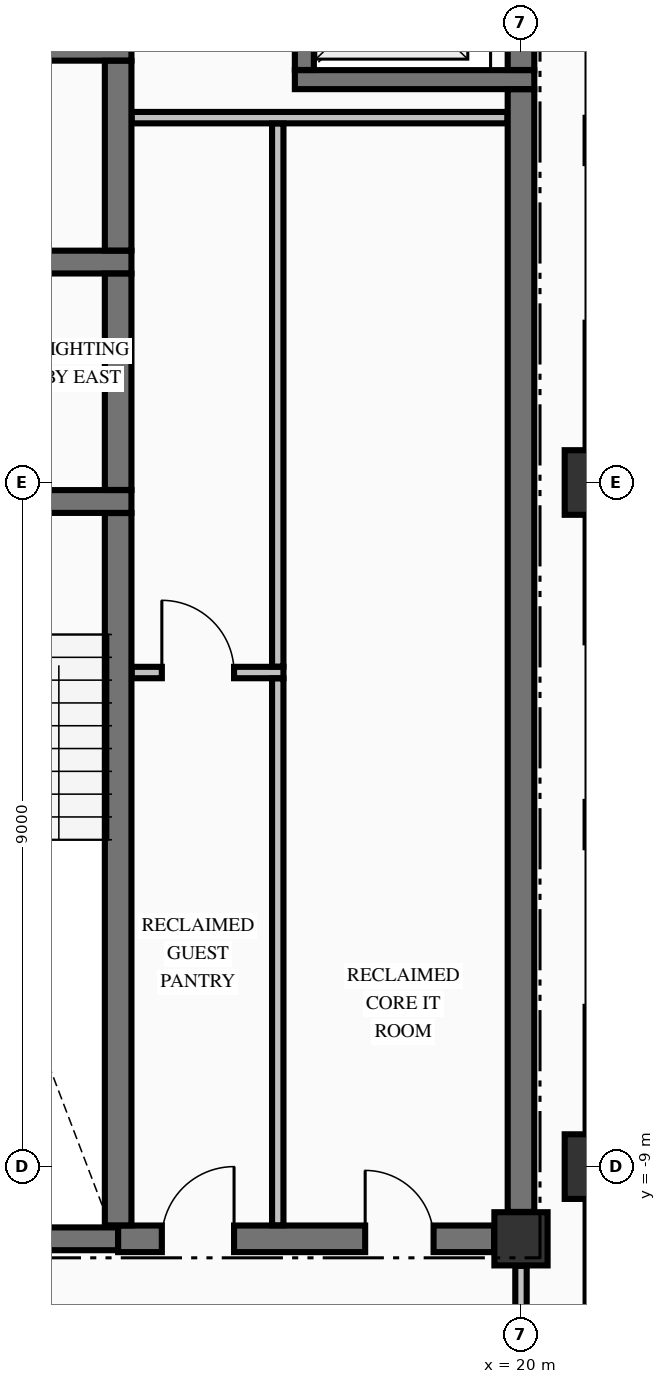
"""IFC4 building model, lengths in metres.
Left out: names, types, materials, properties, quantities, classifications, styles, units other than length and angle.
Written with IfcOpenShell. Run it as: python <this file> out.ifc"""

import sys

from ifc_helpers import new_model, si_unit, direction, frame, frame_2d, origin, origin_2d, place, context, subcontext, project, spatial, rectangle, extrude, element, fill, save


model = new_model("IFC4")
c1 = context("Model", 3, precision=1e-05, world=origin(), true_north=direction((0.0, 1.0)))
c2 = subcontext(c1, "Body", "Model", "MODEL_VIEW")
j1 = project(units=[si_unit("LENGTHUNIT", "METRE"), si_unit("PLANEANGLEUNIT", "RADIAN")], contexts=[c1])
p1 = place(None, origin())
s1 = spatial("IfcSite", under=j1, at=p1, CompositionType="ELEMENT")
p2 = place(p1, origin())
s2 = spatial("IfcBuilding", under=s1, at=p2, CompositionType="ELEMENT")
p3 = place(p2, frame((0.0, 0.0, 260.89)))
s3 = spatial("IfcBuildingStorey", under=s2, at=p3, CompositionType="ELEMENT", Elevation=260.89)
for number, where, z_axis, x_axis in (
    (1, (21.0, -9.0, -0.25), (0.0, 0.0, 1.0), (1.0, 0.0, 0.0)),
    (2, (21.0, 0.0, -0.25), (0.0, 0.0, 1.0), (1.0, 0.0, 0.0)),
):
    element("IfcColumn", number, at=place(p3, frame(where, z_axis=z_axis, x_axis=x_axis)), inside=s3, PredefinedType="COLUMN", context=c2, shape_type="SweptSolid", body=[
        extrude(rectangle(XDim=0.85, YDim=0.85, at=origin_2d()), origin(), (0.0, 0.0, 1.0), 3.23),
    ])
p4 = place(p3, frame((20.0, -9.95, -0.25), z_axis=(0.0, 0.0, 1.0), x_axis=(1.0, 0.0, 0.0)))
e3 = element("IfcColumn", 3, at=p4, inside=s3, PredefinedType="COLUMN", context=c2, shape_type="SweptSolid", body=[
    extrude(rectangle(XDim=0.7, YDim=0.7, at=origin_2d()), origin(), (0.0, 0.0, 1.0), 3.23),
])
p5 = place(p3, frame((21.0, -17.545, 0.0), z_axis=(0.0, 0.0, 1.0), x_axis=(0.0, 1.0, 0.0)))
e4 = element("IfcWall", 4, at=p5, inside=s3, PredefinedType="STANDARD", context=c2, shape_type="SweptSolid", body=[
    extrude(rectangle(XDim=8.09, YDim=0.3, at=frame_2d((4.045, 0.0))), origin(), (0.0, 0.0, 1.0), 2.372),
])
p6 = place(p3, frame((21.0, -8.545, 0.0), z_axis=(0.0, 0.0, 1.0), x_axis=(0.0, 1.0, 0.0)))
e5 = element("IfcWall", 5, at=p6, inside=s3, PredefinedType="STANDARD", context=c2, shape_type="SweptSolid", body=[
    extrude(rectangle(XDim=8.09, YDim=0.3, at=frame_2d((4.045, 0.0))), origin(), (0.0, 0.0, 1.0), 2.372),
])
p7 = place(p6, frame((1.647, 0.0, 0.7)))
e6 = element("IfcOpeningElement", 6, at=p7, cuts=e5, PredefinedType="OPENING", context=c2, shape_type="SweptSolid", body=[
    extrude(rectangle(XDim=2.1, YDim=1.5, at=frame_2d((1.05, 0.75))), frame((0.0, 0.16, 0.0), z_axis=(0.0, -1.0, 0.0), x_axis=(1.0, 0.0, 0.0)), (0.0, 0.0, 1.0), 0.32),
])
p8 = place(p6, frame((4.343, 0.0, 0.7)))
e7 = element("IfcOpeningElement", 7, at=p8, cuts=e5, PredefinedType="OPENING", context=c2, shape_type="SweptSolid", body=[
    extrude(rectangle(XDim=2.1, YDim=1.5, at=frame_2d((1.05, 0.75))), frame((0.0, 0.16, 0.0), z_axis=(0.0, -1.0, 0.0), x_axis=(1.0, 0.0, 0.0)), (0.0, 0.0, 1.0), 0.32),
])
p9 = place(p3, frame((21.0, 0.455, 0.0), z_axis=(0.0, 0.0, 1.0), x_axis=(0.0, 1.0, 0.0)))
e8 = element("IfcWall", 8, at=p9, inside=s3, PredefinedType="STANDARD", context=c2, shape_type="SweptSolid", body=[
    extrude(rectangle(XDim=8.09, YDim=0.3, at=frame_2d((4.045, 0.0))), origin(), (0.0, 0.0, 1.0), 2.372),
])
p10 = place(p9, frame((1.647, 0.0, 0.7)))
e9 = element("IfcOpeningElement", 9, at=p10, cuts=e8, PredefinedType="OPENING", context=c2, shape_type="SweptSolid", body=[
    extrude(rectangle(XDim=2.1, YDim=1.5, at=frame_2d((1.05, 0.75))), frame((0.0, 0.16, 0.0), z_axis=(0.0, -1.0, 0.0), x_axis=(1.0, 0.0, 0.0)), (0.0, 0.0, 1.0), 0.32),
])
p11 = place(p9, frame((4.343, 0.0, 0.7)))
e10 = element("IfcOpeningElement", 10, at=p11, cuts=e8, PredefinedType="OPENING", context=c2, shape_type="SweptSolid", body=[
    extrude(rectangle(XDim=2.1, YDim=1.5, at=frame_2d((1.05, 0.75))), frame((0.0, 0.16, 0.0), z_axis=(0.0, -1.0, 0.0), x_axis=(1.0, 0.0, 0.0)), (0.0, 0.0, 1.0), 0.32),
])
p12 = place(p3, frame((11.354, -9.95, 0.0), z_axis=(0.0, 0.0, 1.0), x_axis=(1.0, 0.0, 0.0)))
e11 = element("IfcWall", 11, at=p12, inside=s3, PredefinedType="SHEAR", context=c2, shape_type="SweptSolid", body=[
    extrude(rectangle(XDim=3.346, YDim=0.3, at=frame_2d((1.673, 0.0))), origin(), (0.0, 0.0, 1.0), 2.98),
])
p13 = place(p3, frame((14.7, -9.95, 0.0), z_axis=(0.0, 0.0, 1.0), x_axis=(1.0, 0.0, 0.0)))
e12 = element("IfcWall", 12, at=p13, inside=s3, PredefinedType="SHEAR", context=c2, shape_type="SweptSolid", body=[
    extrude(rectangle(XDim=4.946, YDim=0.35, at=frame_2d((2.473, 0.0))), origin(), (0.0, 0.0, 1.0), 2.98),
])
p14 = place(p13, frame((3.25, 0.0, 0.0)))
e13 = element("IfcOpeningElement", 13, at=p14, cuts=e12, PredefinedType="OPENING", context=c2, shape_type="SweptSolid", body=[
    extrude(rectangle(XDim=0.9, YDim=2.15, at=frame_2d((0.45, 1.075))), frame((0.0, 0.185, 0.0), z_axis=(0.0, -1.0, 0.0), x_axis=(1.0, 0.0, 0.0)), (0.0, 0.0, 1.0), 0.37),
])
p15 = place(p13, frame((0.575, 0.0, 0.0)))
e14 = element("IfcOpeningElement", 14, at=p15, cuts=e12, PredefinedType="OPENING", context=c2, shape_type="SweptSolid", body=[
    extrude(rectangle(XDim=0.95, YDim=2.15, at=frame_2d((0.475, 1.075))), frame((0.0, 0.185, 0.0), z_axis=(0.0, -1.0, 0.0), x_axis=(1.0, 0.0, 0.0)), (0.0, 0.0, 1.0), 0.37),
])
p16 = place(p3, frame((11.354, -0.25, 0.0), z_axis=(0.0, 0.0, 1.0), x_axis=(1.0, 0.0, 0.0)))
e15 = element("IfcWall", 15, at=p16, inside=s3, PredefinedType="SHEAR", context=c2, shape_type="SweptSolid", body=[
    extrude(rectangle(XDim=3.521, YDim=0.3, at=frame_2d((1.76, 0.0))), origin(), (0.0, 0.0, 1.0), 2.98),
])
p17 = place(p16, frame((1.246, 0.0, 0.0)))
e16 = element("IfcOpeningElement", 16, at=p17, cuts=e15, PredefinedType="OPENING", context=c2, shape_type="SweptSolid", body=[
    extrude(rectangle(XDim=1.1, YDim=2.15, at=frame_2d((0.55, 1.075))), frame((0.0, 0.16, 0.0), z_axis=(0.0, -1.0, 0.0), x_axis=(1.0, 0.0, 0.0)), (0.0, 0.0, 1.0), 0.32),
])
p18 = place(p3, frame((10.85, 2.9, 0.0), z_axis=(0.0, 0.0, 1.0), x_axis=(1.0, 0.0, 0.0)))
e17 = element("IfcWall", 17, at=p18, inside=s3, PredefinedType="SHEAR", context=c2, shape_type="SweptSolid", body=[
    extrude(rectangle(XDim=4.025, YDim=0.3, at=frame_2d((2.012, 0.0))), origin(), (0.0, 0.0, 1.0), 2.98),
])
p19 = place(p18, frame((0.85, 0.0, 0.0)))
e18 = element("IfcOpeningElement", 18, at=p19, cuts=e17, PredefinedType="OPENING", context=c2, shape_type="SweptSolid", body=[
    extrude(rectangle(XDim=1.1, YDim=2.2, at=frame_2d((0.55, 1.1))), frame((0.0, 0.16, 0.0), z_axis=(0.0, -1.0, 0.0), x_axis=(1.0, 0.0, 0.0)), (0.0, 0.0, 1.0), 0.32),
])
p20 = place(p3, frame((17.025, 5.3, 0.0), z_axis=(0.0, 0.0, 1.0), x_axis=(1.0, 0.0, 0.0)))
e19 = element("IfcWall", 19, at=p20, inside=s3, PredefinedType="SOLIDWALL", context=c2, shape_type="SweptSolid", body=[
    extrude(rectangle(XDim=3.15, YDim=0.25, at=frame_2d((1.575, 0.0))), origin(), (0.0, 0.0, 1.0), 2.98),
])
p21 = place(p3, frame((10.85, 5.7, 0.0), z_axis=(0.0, 0.0, 1.0), x_axis=(1.0, 0.0, 0.0)))
e20 = element("IfcWall", 20, at=p21, inside=s3, PredefinedType="SHEAR", context=c2, shape_type="SweptSolid", body=[
    extrude(rectangle(XDim=4.025, YDim=0.3, at=frame_2d((2.012, 0.0))), origin(), (0.0, 0.0, 1.0), 2.98),
])
p22 = place(p3, frame((14.878, -2.5, 0.0), z_axis=(0.0, 0.0, 1.0), x_axis=(1.0, 0.0, 0.0)))
e21 = element("IfcWall", 21, at=p22, inside=s3, PredefinedType="PARTITIONING", context=c2, shape_type="SweptSolid", body=[
    extrude(rectangle(XDim=1.997, YDim=0.15, at=frame_2d((0.999, 0.0))), origin(), (0.0, 0.0, 1.0), 2.98),
])
p23 = place(p22, frame((0.397, 0.0, 0.0)))
e22 = element("IfcOpeningElement", 22, at=p23, cuts=e21, PredefinedType="OPENING", context=c2, shape_type="SweptSolid", body=[
    extrude(rectangle(XDim=0.95, YDim=2.15, at=frame_2d((0.475, 1.075))), frame((0.0, 0.085, 0.0), z_axis=(0.0, -1.0, 0.0), x_axis=(1.0, 0.0, 0.0)), (0.0, 0.0, 1.0), 0.17),
])
p24 = place(p3, frame((14.878, 4.8, 0.0), z_axis=(0.0, 0.0, 1.0), x_axis=(1.0, 0.0, 0.0)))
e23 = element("IfcWall", 23, at=p24, inside=s3, PredefinedType="PARTITIONING", context=c2, shape_type="SweptSolid", body=[
    extrude(rectangle(XDim=4.944, YDim=0.15, at=frame_2d((2.472, 0.0))), origin(), (0.0, 0.0, 1.0), 2.98),
])
p25 = place(p3, frame((14.7, -9.773, 0.0), z_axis=(0.0, 0.0, 1.0), x_axis=(0.0, 1.0, 0.0)))
e24 = element("IfcWall", 24, at=p25, inside=s3, PredefinedType="SHEAR", context=c2, shape_type="SweptSolid", body=[
    extrude(rectangle(XDim=9.371, YDim=0.35, at=frame_2d((4.686, 0.0))), origin(), (0.0, 0.0, 1.0), 2.98),
])
p26 = place(p3, frame((14.7, -0.098, 0.0), z_axis=(0.0, 0.0, 1.0), x_axis=(0.0, 1.0, 0.0)))
e25 = element("IfcWall", 25, at=p26, inside=s3, PredefinedType="SHEAR", context=c2, shape_type="SweptSolid", body=[
    extrude(rectangle(XDim=2.846, YDim=0.35, at=frame_2d((1.423, 0.0))), origin(), (0.0, 0.0, 1.0), 2.98),
])
p27 = place(p3, frame((14.7, 3.052, 0.0), z_axis=(0.0, 0.0, 1.0), x_axis=(0.0, 1.0, 0.0)))
e26 = element("IfcWall", 26, at=p27, inside=s3, PredefinedType="SHEAR", context=c2, shape_type="SweptSolid", body=[
    extrude(rectangle(XDim=2.496, YDim=0.35, at=frame_2d((1.248, 0.0))), origin(), (0.0, 0.0, 1.0), 2.98),
])
p28 = place(p3, frame((17.15, 5.427, 0.0), z_axis=(0.0, 0.0, 1.0), x_axis=(0.0, 1.0, 0.0)))
e27 = element("IfcWall", 27, at=p28, inside=s3, PredefinedType="SOLIDWALL", context=c2, shape_type="SweptSolid", body=[
    extrude(rectangle(XDim=2.196, YDim=0.25, at=frame_2d((1.098, 0.0))), origin(), (0.0, 0.0, 1.0), 2.98),
])
p29 = place(p28, frame((0.548, 0.0, 0.0)))
e28 = element("IfcOpeningElement", 28, at=p29, cuts=e27, PredefinedType="OPENING", context=c2, shape_type="SweptSolid", body=[
    extrude(rectangle(XDim=1.1, YDim=2.2, at=frame_2d((0.55, 1.1))), frame((0.0, 0.135, 0.0), z_axis=(0.0, -1.0, 0.0), x_axis=(1.0, 0.0, 0.0)), (0.0, 0.0, 1.0), 0.27),
])
p30 = place(p3, frame((20.0, -9.596, 0.0), z_axis=(0.0, 0.0, 1.0), x_axis=(0.0, 1.0, 0.0)))
e29 = element("IfcWall", 29, at=p30, inside=s3, PredefinedType="SHEAR", context=c2, shape_type="SweptSolid", body=[
    extrude(rectangle(XDim=14.769, YDim=0.35, at=frame_2d((7.385, 0.0))), origin(), (0.0, 0.0, 1.0), 2.98),
])
p31 = place(p3, frame((20.0, 5.427, 0.0), z_axis=(0.0, 0.0, 1.0), x_axis=(0.0, 1.0, 0.0)))
e30 = element("IfcWall", 30, at=p31, inside=s3, PredefinedType="SHEAR", context=c2, shape_type="SweptSolid", body=[
    extrude(rectangle(XDim=2.196, YDim=0.35, at=frame_2d((1.098, 0.0))), origin(), (0.0, 0.0, 1.0), 2.98),
])
p32 = place(p3, frame((16.8, -9.772, 0.0), z_axis=(0.0, 0.0, 1.0), x_axis=(0.0, 1.0, 0.0)))
e31 = element("IfcWall", 31, at=p32, inside=s3, PredefinedType="PARTITIONING", context=c2, shape_type="SweptSolid", body=[
    extrude(rectangle(XDim=7.194, YDim=0.15, at=frame_2d((3.597, 0.0))), origin(), (0.0, 0.0, 1.0), 2.98),
])
p33 = place(p3, frame((16.8, -2.422, 0.0), z_axis=(0.0, 0.0, 1.0), x_axis=(0.0, 1.0, 0.0)))
e32 = element("IfcWall", 32, at=p33, inside=s3, PredefinedType="PARTITIONING", context=c2, shape_type="SweptSolid", body=[
    extrude(rectangle(XDim=7.144, YDim=0.15, at=frame_2d((3.572, 0.0))), origin(), (0.0, 0.0, 1.0), 2.98),
])
p34 = place(p3, frame((20.0, -12.122, 0.0), z_axis=(0.0, 0.0, 1.0), x_axis=(0.0, 1.0, 0.0)))
e33 = element("IfcWall", 33, at=p34, inside=s3, PredefinedType="PARTITIONING", context=c2, shape_type="SweptSolid", body=[
    extrude(rectangle(XDim=1.816, YDim=0.15, at=frame_2d((0.908, 0.0))), origin(), (0.0, 0.0, 1.0), 2.57),
])
p35 = place(p14, origin())
e34 = element("IfcDoor", 34, at=p35, inside=s3, OperationType="SINGLE_SWING_LEFT", PredefinedType="DOOR", context=c2, shape_type="SweptSolid", body=[
    extrude(rectangle(XDim=0.9, YDim=2.15, at=frame_2d((0.45, 1.075))), frame((0.0, 0.025, 0.0), z_axis=(0.0, -1.0, 0.0), x_axis=(1.0, 0.0, 0.0)), (0.0, 0.0, 1.0), 0.05),
])
fill(e13, e34)
p36 = place(p15, origin())
e35 = element("IfcDoor", 35, at=p36, inside=s3, OperationType="SINGLE_SWING_RIGHT", PredefinedType="DOOR", context=c2, shape_type="SweptSolid", body=[
    extrude(rectangle(XDim=0.95, YDim=2.15, at=frame_2d((0.475, 1.075))), frame((0.0, 0.025, 0.0), z_axis=(0.0, -1.0, 0.0), x_axis=(1.0, 0.0, 0.0)), (0.0, 0.0, 1.0), 0.05),
])
fill(e14, e35)
p37 = place(p23, origin())
e36 = element("IfcDoor", 36, at=p37, inside=s3, OperationType="SINGLE_SWING_LEFT", PredefinedType="DOOR", context=c2, shape_type="SweptSolid", body=[
    extrude(rectangle(XDim=0.95, YDim=2.15, at=frame_2d((0.475, 1.075))), frame((0.0, 0.025, 0.0), z_axis=(0.0, -1.0, 0.0), x_axis=(1.0, 0.0, 0.0)), (0.0, 0.0, 1.0), 0.05),
])
fill(e22, e36)
save(model, sys.argv[1])
